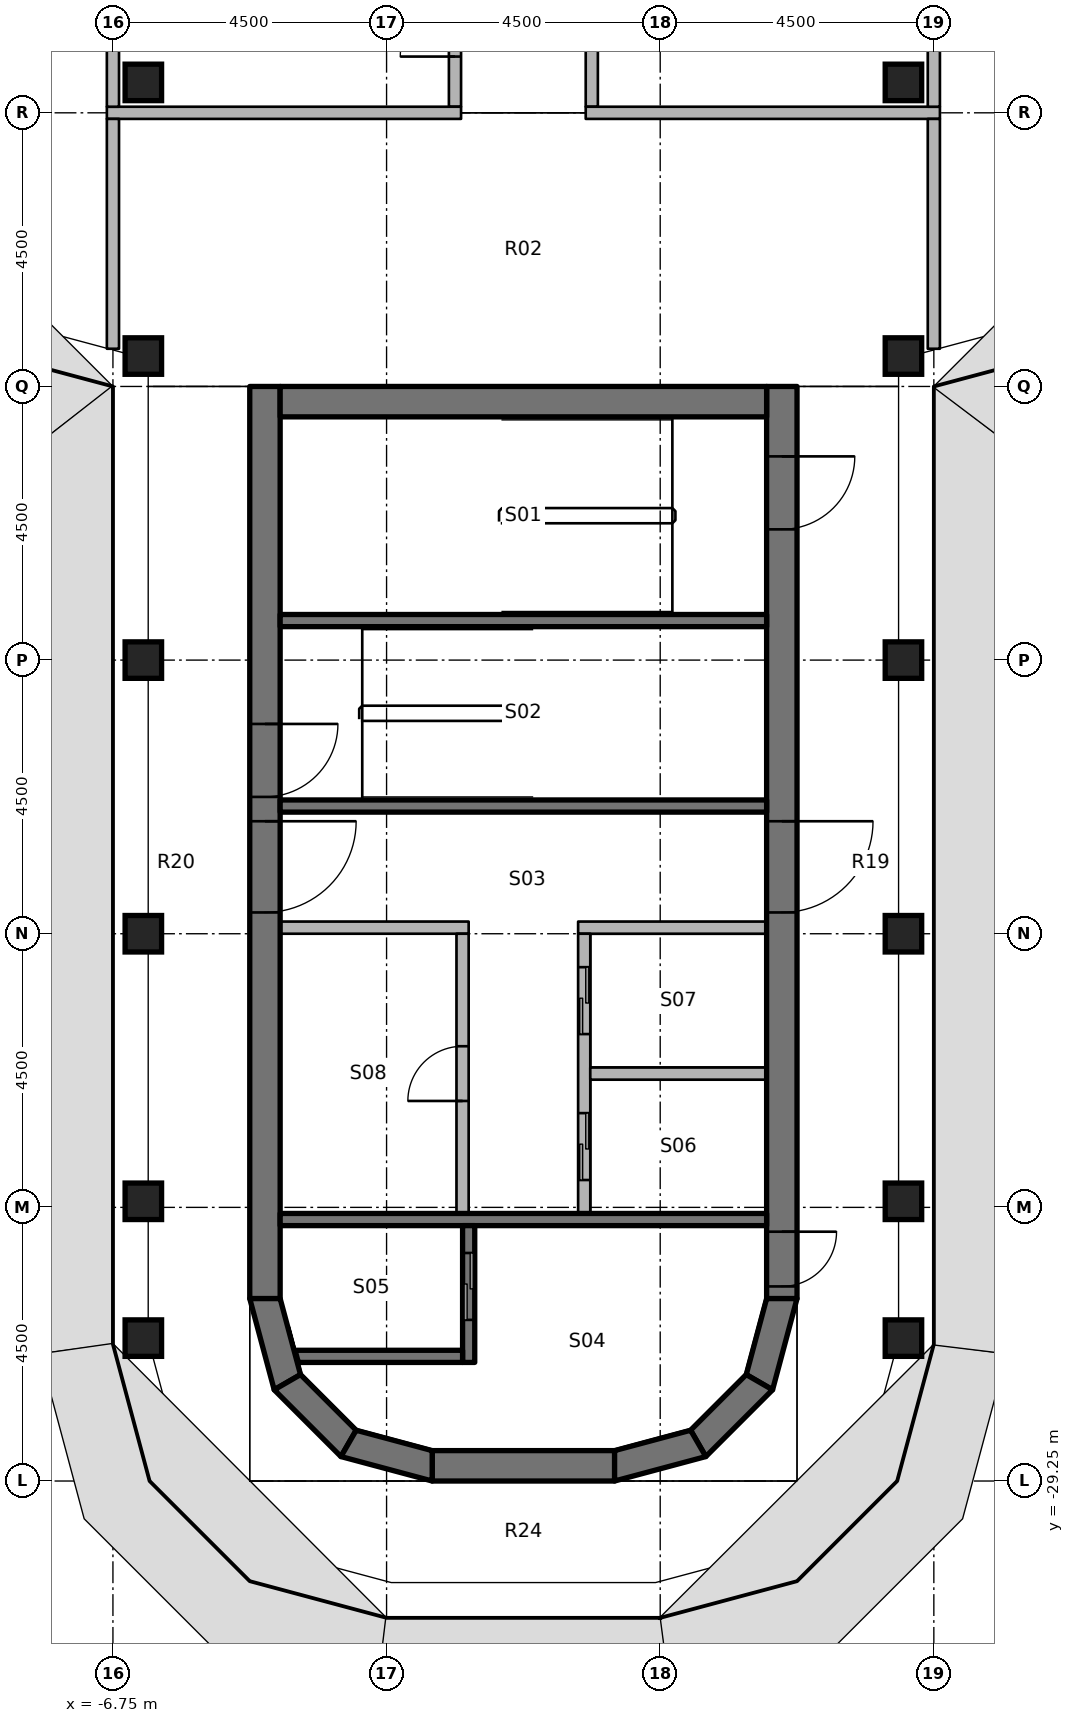
"""IFC4 building model, lengths in metres.
Left out: names, types, materials, properties, quantities, classifications, styles, units other than length and angle.
Written with IfcOpenShell. Run it as: python <this file> out.ifc"""

import sys

from ifc_helpers import new_model, si_unit, direction, frame, frame_2d, origin, origin_2d, place, context, subcontext, project, spatial, polyline, rectangle, outline, extrude, element, fill, save


model = new_model("IFC4")
c1 = context("Model", 3, precision=1e-05, world=origin(), true_north=direction((0.0, 1.0)))
c2 = subcontext(c1, "Body", "Model", "MODEL_VIEW")
j1 = project(units=[si_unit("LENGTHUNIT", "METRE"), si_unit("PLANEANGLEUNIT", "RADIAN")], contexts=[c1])
p1 = place(None, origin())
s1 = spatial("IfcSite", under=j1, at=p1, CompositionType="ELEMENT")
p2 = place(p1, origin())
s2 = spatial("IfcBuilding", under=s1, at=p2, CompositionType="ELEMENT")
p3 = place(p2, frame((0.0, 0.0, 249.8)))
s3 = spatial("IfcBuildingStorey", under=s2, at=p3, CompositionType="ELEMENT", Elevation=249.8)
for number, where, z_axis, x_axis in (
    (1, (-6.25, -26.9, 0.0), (0.0, 0.0, 1.0), (1.0, 0.0, 0.0)),
    (2, (-6.25, -24.65, 0.0), (0.0, 0.0, 1.0), (1.0, 0.0, 0.0)),
    (3, (-6.25, -20.25, 0.0), (0.0, 0.0, 1.0), (1.0, 0.0, 0.0)),
    (4, (-6.25, -15.75, 0.0), (0.0, 0.0, 1.0), (1.0, 0.0, 0.0)),
    (5, (-6.25, -10.75, 0.0), (0.0, 0.0, 1.0), (1.0, 0.0, 0.0)),
    (6, (-6.25, -6.25, 0.0), (0.0, 0.0, 1.0), (1.0, 0.0, 0.0)),
    (7, (6.25, -26.9, 0.0), (0.0, 0.0, 1.0), (1.0, 0.0, 0.0)),
    (8, (6.25, -24.65, 0.0), (0.0, 0.0, 1.0), (1.0, 0.0, 0.0)),
    (9, (6.25, -20.25, 0.0), (0.0, 0.0, 1.0), (1.0, 0.0, 0.0)),
    (10, (6.25, -15.75, 0.0), (0.0, 0.0, 1.0), (1.0, 0.0, 0.0)),
    (11, (6.25, -10.75, 0.0), (0.0, 0.0, 1.0), (1.0, 0.0, 0.0)),
    (12, (6.25, -6.25, 0.0), (0.0, 0.0, 1.0), (1.0, 0.0, 0.0)),
):
    element("IfcColumn", number, at=place(p3, frame(where, z_axis=z_axis, x_axis=x_axis)), inside=s3, PredefinedType="COLUMN", context=c2, shape_type="SweptSolid", body=[
        extrude(rectangle(XDim=0.6, YDim=0.6, at=origin_2d()), origin(), (0.0, 0.0, 1.0), 3.65),
    ])
p4 = place(p3, frame((-4.25, -11.25, 0.0), z_axis=(0.0, 0.0, 1.0), x_axis=(0.0, -1.0, 0.0)))
e13 = element("IfcWall", 13, at=p4, inside=s3, PredefinedType="SHEAR", context=c2, shape_type="SweptSolid", body=[
    extrude(rectangle(XDim=15.0, YDim=0.5, at=frame_2d((7.5, 0.0))), origin(), (0.0, 0.0, 1.0), 3.8),
])
p5 = place(p4, frame((7.15, 0.0, 0.0)))
e14 = element("IfcOpeningElement", 14, at=p5, cuts=e13, PredefinedType="OPENING", context=c2, shape_type="SweptSolid", body=[
    extrude(rectangle(XDim=1.5, YDim=2.3, at=frame_2d((0.75, 1.15))), frame((0.0, 0.26, 0.0), z_axis=(0.0, -1.0, 0.0), x_axis=(1.0, 0.0, 0.0)), (0.0, 0.0, 1.0), 0.52),
])
p6 = place(p4, frame((5.55, 0.0, 0.0)))
e15 = element("IfcOpeningElement", 15, at=p6, cuts=e13, PredefinedType="OPENING", context=c2, shape_type="SweptSolid", body=[
    extrude(rectangle(XDim=1.2, YDim=2.1, at=frame_2d((0.6, 1.05))), frame((0.0, 0.26, 0.0), z_axis=(0.0, -1.0, 0.0), x_axis=(1.0, 0.0, 0.0)), (0.0, 0.0, 1.0), 0.52),
])
p7 = place(p3, frame((4.25, -11.25, 0.0), z_axis=(0.0, 0.0, 1.0), x_axis=(0.0, -1.0, 0.0)))
e16 = element("IfcWall", 16, at=p7, inside=s3, PredefinedType="SHEAR", context=c2, shape_type="SweptSolid", body=[
    extrude(rectangle(XDim=15.0, YDim=0.5, at=frame_2d((7.5, 0.0))), origin(), (0.0, 0.0, 1.0), 3.8),
])
p8 = place(p7, frame((7.15, 0.0, 0.0)))
e17 = element("IfcOpeningElement", 17, at=p8, cuts=e16, PredefinedType="OPENING", context=c2, shape_type="SweptSolid", body=[
    extrude(rectangle(XDim=1.5, YDim=2.3, at=frame_2d((0.75, 1.15))), frame((0.0, 0.26, 0.0), z_axis=(0.0, -1.0, 0.0), x_axis=(1.0, 0.0, 0.0)), (0.0, 0.0, 1.0), 0.52),
])
p9 = place(p7, frame((13.9, 0.0, 0.0)))
e18 = element("IfcOpeningElement", 18, at=p9, cuts=e16, PredefinedType="OPENING", context=c2, shape_type="SweptSolid", body=[
    extrude(rectangle(XDim=0.9, YDim=2.1, at=frame_2d((0.45, 1.05))), frame((0.0, 0.26, 0.0), z_axis=(0.0, -1.0, 0.0), x_axis=(1.0, 0.0, 0.0)), (0.0, 0.0, 1.0), 0.52),
])
p10 = place(p7, frame((1.15, 0.0, 0.0)))
e19 = element("IfcOpeningElement", 19, at=p10, cuts=e16, PredefinedType="OPENING", context=c2, shape_type="SweptSolid", body=[
    extrude(rectangle(XDim=1.2, YDim=2.1, at=frame_2d((0.6, 1.05))), frame((0.0, 0.26, 0.0), z_axis=(0.0, -1.0, 0.0), x_axis=(1.0, 0.0, 0.0)), (0.0, 0.0, 1.0), 0.52),
])
p11 = place(p3, frame((-4.0, -11.5, 0.0), z_axis=(0.0, 0.0, 1.0), x_axis=(1.0, 0.0, 0.0)))
e20 = element("IfcWall", 20, at=p11, inside=s3, PredefinedType="SHEAR", context=c2, shape_type="SweptSolid", body=[
    extrude(rectangle(XDim=8.0, YDim=0.5, at=frame_2d((4.0, 0.0))), origin(), (0.0, 0.0, 1.0), 3.8),
])
p12 = place(p3, frame((-1.5, -29.0, 0.0), z_axis=(0.0, 0.0, 1.0), x_axis=(1.0, 0.0, 0.0)))
e21 = element("IfcWall", 21, at=p12, inside=s3, PredefinedType="SHEAR", context=c2, shape_type="SweptSolid", body=[
    extrude(rectangle(XDim=3.0, YDim=0.5, at=frame_2d((1.5, 0.0))), origin(), (0.0, 0.0, 1.0), 3.8),
])
p13 = place(p3, origin())
e22 = element("IfcWall", 22, at=p13, inside=s3, PredefinedType="SHEAR", context=c2, shape_type="SweptSolid", body=[
    extrude(outline(polyline([(-4.5, -26.25), (-4.098, -27.75), (-3.665, -27.5), (-4.0, -26.25), (-4.5, -26.25)])), origin(), (0.0, 0.0, 1.0), 3.8),
])
p14 = place(p3, origin())
e23 = element("IfcWall", 23, at=p14, inside=s3, PredefinedType="SHEAR", context=c2, shape_type="SweptSolid", body=[
    extrude(outline(polyline([(-4.098, -27.75), (-3.0, -28.848), (-2.75, -28.415), (-3.665, -27.5), (-4.098, -27.75)])), origin(), (0.0, 0.0, 1.0), 3.8),
])
p15 = place(p3, origin())
e24 = element("IfcWall", 24, at=p15, inside=s3, PredefinedType="SHEAR", context=c2, shape_type="SweptSolid", body=[
    extrude(outline(polyline([(-3.0, -28.848), (-1.5, -29.25), (-1.5, -28.75), (-2.75, -28.415), (-3.0, -28.848)])), origin(), (0.0, 0.0, 1.0), 3.8),
])
p16 = place(p3, origin())
e25 = element("IfcWall", 25, at=p16, inside=s3, PredefinedType="SHEAR", context=c2, shape_type="SweptSolid", body=[
    extrude(outline(polyline([(4.5, -26.25), (4.098, -27.75), (3.665, -27.5), (4.0, -26.25), (4.5, -26.25)])), origin(), (0.0, 0.0, 1.0), 3.8),
])
p17 = place(p3, origin())
e26 = element("IfcWall", 26, at=p17, inside=s3, PredefinedType="SHEAR", context=c2, shape_type="SweptSolid", body=[
    extrude(outline(polyline([(4.098, -27.75), (3.0, -28.848), (2.75, -28.415), (3.665, -27.5), (4.098, -27.75)])), origin(), (0.0, 0.0, 1.0), 3.8),
])
p18 = place(p3, origin())
e27 = element("IfcWall", 27, at=p18, inside=s3, PredefinedType="SHEAR", context=c2, shape_type="SweptSolid", body=[
    extrude(outline(polyline([(3.0, -28.848), (1.5, -29.25), (1.5, -28.75), (2.75, -28.415), (3.0, -28.848)])), origin(), (0.0, 0.0, 1.0), 3.8),
])
p19 = place(p3, frame((4.0, -24.95, 0.0), z_axis=(0.0, 0.0, 1.0), x_axis=(-1.0, 0.0, 0.0)))
e28 = element("IfcWall", 28, at=p19, inside=s3, PredefinedType="SHEAR", context=c2, shape_type="SweptSolid", body=[
    extrude(rectangle(XDim=8.0, YDim=0.2, at=frame_2d((4.0, 0.0))), origin(), (0.0, 0.0, 1.0), 3.65),
])
p20 = place(p3, frame((-0.9, -27.3, 0.0), z_axis=(0.0, 0.0, 1.0), x_axis=(0.0, 1.0, 0.0)))
e29 = element("IfcWall", 29, at=p20, inside=s3, PredefinedType="SHEAR", context=c2, shape_type="SweptSolid", body=[
    extrude(rectangle(XDim=2.25, YDim=0.2, at=frame_2d((1.125, 0.0))), origin(), (0.0, 0.0, 1.0), 3.65),
])
p21 = place(p20, frame((0.7, 0.0, 0.0)))
e30 = element("IfcOpeningElement", 30, at=p21, cuts=e29, PredefinedType="OPENING", context=c2, shape_type="SweptSolid", body=[
    extrude(rectangle(XDim=1.1, YDim=2.3, at=frame_2d((0.55, 1.15))), frame((0.0, 0.11, 0.0), z_axis=(0.0, -1.0, 0.0), x_axis=(1.0, 0.0, 0.0)), (0.0, 0.0, 1.0), 0.22),
])
p22 = place(p3, origin())
e31 = element("IfcWall", 31, at=p22, inside=s3, PredefinedType="SHEAR", context=c2, shape_type="SweptSolid", body=[
    extrude(outline(polyline([(-1.0, -27.1), (-3.755, -27.1), (-3.701, -27.3), (-1.0, -27.3), (-1.0, -27.1)])), origin(), (0.0, 0.0, 1.0), 3.65),
])
for number, where, z_axis, x_axis in (
    (32, (4.0, -18.15, 0.0), (0.0, 0.0, 1.0), (-1.0, 0.0, 0.0)),
    (33, (4.0, -15.1, 0.0), (0.0, 0.0, 1.0), (-1.0, 0.0, 0.0)),
):
    element("IfcWall", number, at=place(p3, frame(where, z_axis=z_axis, x_axis=x_axis)), inside=s3, PredefinedType="SHEAR", context=c2, shape_type="SweptSolid", body=[
        extrude(rectangle(XDim=8.0, YDim=0.2, at=frame_2d((4.0, 0.0))), origin(), (0.0, 0.0, 1.0), 3.65),
    ])
p23 = place(p3, frame((4.0, -20.15, 0.0), z_axis=(0.0, 0.0, 1.0), x_axis=(-1.0, 0.0, 0.0)))
e34 = element("IfcWall", 34, at=p23, inside=s3, PredefinedType="PARTITIONING", context=c2, shape_type="SweptSolid", body=[
    extrude(rectangle(XDim=3.1, YDim=0.2, at=frame_2d((1.55, 0.0))), origin(), (0.0, 0.0, 1.0), 3.65),
])
p24 = place(p3, frame((1.0, -24.85, 0.0), z_axis=(0.0, 0.0, 1.0), x_axis=(0.0, 1.0, 0.0)))
e35 = element("IfcWall", 35, at=p24, inside=s3, PredefinedType="PARTITIONING", context=c2, shape_type="SweptSolid", body=[
    extrude(rectangle(XDim=4.6, YDim=0.2, at=frame_2d((2.3, 0.0))), origin(), (0.0, 0.0, 1.0), 3.65),
])
p25 = place(p24, frame((0.55, 0.0, 0.0)))
e36 = element("IfcOpeningElement", 36, at=p25, cuts=e35, PredefinedType="OPENING", context=c2, shape_type="SweptSolid", body=[
    extrude(rectangle(XDim=1.1, YDim=2.3, at=frame_2d((0.55, 1.15))), frame((0.0, 0.11, 0.0), z_axis=(0.0, -1.0, 0.0), x_axis=(1.0, 0.0, 0.0)), (0.0, 0.0, 1.0), 0.22),
])
p26 = place(p24, frame((2.95, 0.0, 0.0)))
e37 = element("IfcOpeningElement", 37, at=p26, cuts=e35, PredefinedType="OPENING", context=c2, shape_type="SweptSolid", body=[
    extrude(rectangle(XDim=1.1, YDim=2.3, at=frame_2d((0.55, 1.15))), frame((0.0, 0.11, 0.0), z_axis=(0.0, -1.0, 0.0), x_axis=(1.0, 0.0, 0.0)), (0.0, 0.0, 1.0), 0.22),
])
p27 = place(p3, frame((-0.9, -20.15, 0.0), z_axis=(0.0, 0.0, 1.0), x_axis=(-1.0, 0.0, 0.0)))
e38 = element("IfcWall", 38, at=p27, inside=s3, PredefinedType="PARTITIONING", context=c2, shape_type="SweptSolid", body=[
    extrude(rectangle(XDim=3.1, YDim=0.2, at=frame_2d((1.55, 0.0))), origin(), (0.0, 0.0, 1.0), 3.65),
])
p28 = place(p3, frame((-1.0, -24.85, 0.0), z_axis=(0.0, 0.0, 1.0), x_axis=(0.0, 1.0, 0.0)))
e39 = element("IfcWall", 39, at=p28, inside=s3, PredefinedType="PARTITIONING", context=c2, shape_type="SweptSolid", body=[
    extrude(rectangle(XDim=4.6, YDim=0.2, at=frame_2d((2.3, 0.0))), origin(), (0.0, 0.0, 1.0), 3.65),
])
p29 = place(p28, frame((1.85, 0.0, 0.0)))
e40 = element("IfcOpeningElement", 40, at=p29, cuts=e39, PredefinedType="OPENING", context=c2, shape_type="SweptSolid", body=[
    extrude(rectangle(XDim=0.9, YDim=2.1, at=frame_2d((0.45, 1.05))), frame((0.0, 0.11, 0.0), z_axis=(0.0, -1.0, 0.0), x_axis=(1.0, 0.0, 0.0)), (0.0, 0.0, 1.0), 0.22),
])
p30 = place(p3, frame((4.0, -22.55, 0.0), z_axis=(0.0, 0.0, 1.0), x_axis=(-1.0, 0.0, 0.0)))
e41 = element("IfcWall", 41, at=p30, inside=s3, PredefinedType="PARTITIONING", context=c2, shape_type="SweptSolid", body=[
    extrude(rectangle(XDim=2.9, YDim=0.2, at=frame_2d((1.45, 0.0))), origin(), (0.0, 0.0, 1.0), 3.65),
])
p31 = place(p3, frame((1.125, -6.65, 0.0), z_axis=(0.0, 0.0, 1.0), x_axis=(0.0, 1.0, 0.0)))
e42 = element("IfcWall", 42, at=p31, inside=s3, PredefinedType="PARTITIONING", context=c2, shape_type="SweptSolid", body=[
    extrude(rectangle(XDim=5.425, YDim=0.2, at=frame_2d((2.712, 0.0))), origin(), (0.0, 0.0, 1.0), 2.75),
])
p32 = place(p3, frame((-1.125, -6.65, 0.0), z_axis=(0.0, 0.0, 1.0), x_axis=(0.0, 1.0, 0.0)))
e43 = element("IfcWall", 43, at=p32, inside=s3, PredefinedType="PARTITIONING", context=c2, shape_type="SweptSolid", body=[
    extrude(rectangle(XDim=2.55, YDim=0.2, at=frame_2d((1.275, 0.0))), origin(), (0.0, 0.0, 1.0), 2.75),
])
p33 = place(p32, frame((0.825, 0.0, 0.0)))
e44 = element("IfcOpeningElement", 44, at=p33, cuts=e43, PredefinedType="OPENING", context=c2, shape_type="SweptSolid", body=[
    extrude(rectangle(XDim=0.9, YDim=2.1, at=frame_2d((0.45, 1.05))), frame((0.0, 0.11, 0.0), z_axis=(0.0, -1.0, 0.0), x_axis=(1.0, 0.0, 0.0)), (0.0, 0.0, 1.0), 0.22),
])
p34 = place(p3, frame((1.025, -6.75, 0.0), z_axis=(0.0, 0.0, 1.0), x_axis=(1.0, 0.0, 0.0)))
e45 = element("IfcWall", 45, at=p34, inside=s3, PredefinedType="PARTITIONING", context=c2, shape_type="SweptSolid", body=[
    extrude(rectangle(XDim=5.825, YDim=0.2, at=frame_2d((2.913, 0.0))), origin(), (0.0, 0.0, 1.0), 2.75),
])
p35 = place(p3, frame((6.75, -10.63, 0.0), z_axis=(0.0, 0.0, 1.0), x_axis=(0.0, 1.0, 0.0)))
e46 = element("IfcWall", 46, at=p35, inside=s3, PredefinedType="PARTITIONING", context=c2, shape_type="SweptSolid", body=[
    extrude(rectangle(XDim=3.78, YDim=0.2, at=frame_2d((1.89, 0.0))), origin(), (0.0, 0.0, 1.0), 2.75),
])
p36 = place(p3, frame((-6.85, -6.75, 0.0), z_axis=(0.0, 0.0, 1.0), x_axis=(1.0, 0.0, 0.0)))
e47 = element("IfcWall", 47, at=p36, inside=s3, PredefinedType="PARTITIONING", context=c2, shape_type="SweptSolid", body=[
    extrude(rectangle(XDim=5.825, YDim=0.2, at=frame_2d((2.913, 0.0))), origin(), (0.0, 0.0, 1.0), 2.75),
])
p37 = place(p3, frame((-6.75, -10.63, 0.0), z_axis=(0.0, 0.0, 1.0), x_axis=(0.0, 1.0, 0.0)))
e48 = element("IfcWall", 48, at=p37, inside=s3, PredefinedType="PARTITIONING", context=c2, shape_type="SweptSolid", body=[
    extrude(rectangle(XDim=3.78, YDim=0.2, at=frame_2d((1.89, 0.0))), origin(), (0.0, 0.0, 1.0), 2.75),
])
p38 = place(p3, frame((6.75, -6.65, 0.0), z_axis=(0.0, 0.0, 1.0), x_axis=(0.0, 1.0, 0.0)))
e49 = element("IfcWall", 49, at=p38, inside=s3, PredefinedType="PARTITIONING", context=c2, shape_type="SweptSolid", body=[
    extrude(rectangle(XDim=5.425, YDim=0.2, at=frame_2d((2.712, 0.0))), origin(), (0.0, 0.0, 1.0), 2.75),
])
p39 = place(p3, frame((-6.75, -6.65, 0.0), z_axis=(0.0, 0.0, 1.0), x_axis=(0.0, 1.0, 0.0)))
e50 = element("IfcWall", 50, at=p39, inside=s3, PredefinedType="PARTITIONING", context=c2, shape_type="SweptSolid", body=[
    extrude(rectangle(XDim=2.55, YDim=0.2, at=frame_2d((1.275, 0.0))), origin(), (0.0, 0.0, 1.0), 2.75),
])
p40 = place(p8, origin())
e51 = element("IfcDoor", 51, at=p40, inside=s3, OperationType="DOUBLE_DOOR_SINGLE_SWING", PredefinedType="DOOR", context=c2, shape_type="SweptSolid", body=[
    extrude(rectangle(XDim=1.5, YDim=2.3, at=frame_2d((0.75, 1.15))), frame((0.0, 0.025, 0.0), z_axis=(0.0, -1.0, 0.0), x_axis=(1.0, 0.0, 0.0)), (0.0, 0.0, 1.0), 0.05),
])
fill(e17, e51)
p41 = place(p5, origin())
e52 = element("IfcDoor", 52, at=p41, inside=s3, OperationType="DOUBLE_DOOR_SINGLE_SWING", PredefinedType="DOOR", context=c2, shape_type="SweptSolid", body=[
    extrude(rectangle(XDim=1.5, YDim=2.3, at=frame_2d((0.75, 1.15))), frame((0.0, 0.025, 0.0), z_axis=(0.0, -1.0, 0.0), x_axis=(1.0, 0.0, 0.0)), (0.0, 0.0, 1.0), 0.05),
])
fill(e14, e52)
p42 = place(p9, origin())
e53 = element("IfcDoor", 53, at=p42, inside=s3, OperationType="SINGLE_SWING_LEFT", PredefinedType="DOOR", context=c2, shape_type="SweptSolid", body=[
    extrude(rectangle(XDim=0.9, YDim=2.1, at=frame_2d((0.45, 1.05))), frame((0.0, 0.025, 0.0), z_axis=(0.0, -1.0, 0.0), x_axis=(1.0, 0.0, 0.0)), (0.0, 0.0, 1.0), 0.05),
])
fill(e18, e53)
p43 = place(p6, origin())
e54 = element("IfcDoor", 54, at=p43, inside=s3, OperationType="SINGLE_SWING_LEFT", PredefinedType="DOOR", context=c2, shape_type="SweptSolid", body=[
    extrude(rectangle(XDim=1.2, YDim=2.1, at=frame_2d((0.6, 1.05))), frame((0.0, 0.025, 0.0), z_axis=(0.0, -1.0, 0.0), x_axis=(1.0, 0.0, 0.0)), (0.0, 0.0, 1.0), 0.05),
])
fill(e15, e54)
p44 = place(p10, origin())
e55 = element("IfcDoor", 55, at=p44, inside=s3, OperationType="SINGLE_SWING_RIGHT", PredefinedType="DOOR", context=c2, shape_type="SweptSolid", body=[
    extrude(rectangle(XDim=1.2, YDim=2.1, at=frame_2d((0.6, 1.05))), frame((0.0, 0.025, 0.0), z_axis=(0.0, -1.0, 0.0), x_axis=(1.0, 0.0, 0.0)), (0.0, 0.0, 1.0), 0.05),
])
fill(e19, e55)
p45 = place(p21, origin())
e56 = element("IfcDoor", 56, at=p45, inside=s3, OperationType="DOUBLE_DOOR_SLIDING", PredefinedType="DOOR", context=c2, shape_type="SweptSolid", body=[
    extrude(rectangle(XDim=1.1, YDim=2.3, at=frame_2d((0.55, 1.15))), frame((0.0, 0.025, 0.0), z_axis=(0.0, -1.0, 0.0), x_axis=(1.0, 0.0, 0.0)), (0.0, 0.0, 1.0), 0.05),
])
fill(e30, e56)
p46 = place(p25, origin())
e57 = element("IfcDoor", 57, at=p46, inside=s3, OperationType="DOUBLE_DOOR_SLIDING", PredefinedType="DOOR", context=c2, shape_type="SweptSolid", body=[
    extrude(rectangle(XDim=1.1, YDim=2.3, at=frame_2d((0.55, 1.15))), frame((0.0, 0.025, 0.0), z_axis=(0.0, -1.0, 0.0), x_axis=(1.0, 0.0, 0.0)), (0.0, 0.0, 1.0), 0.05),
])
fill(e36, e57)
p47 = place(p26, origin())
e58 = element("IfcDoor", 58, at=p47, inside=s3, OperationType="DOUBLE_DOOR_SLIDING", PredefinedType="DOOR", context=c2, shape_type="SweptSolid", body=[
    extrude(rectangle(XDim=1.1, YDim=2.3, at=frame_2d((0.55, 1.15))), frame((0.0, 0.025, 0.0), z_axis=(0.0, -1.0, 0.0), x_axis=(1.0, 0.0, 0.0)), (0.0, 0.0, 1.0), 0.05),
])
fill(e37, e58)
p48 = place(p29, origin())
e59 = element("IfcDoor", 59, at=p48, inside=s3, OperationType="SINGLE_SWING_LEFT", PredefinedType="DOOR", context=c2, shape_type="SweptSolid", body=[
    extrude(rectangle(XDim=0.9, YDim=2.1, at=frame_2d((0.45, 1.05))), frame((0.0, 0.025, 0.0), z_axis=(0.0, -1.0, 0.0), x_axis=(1.0, 0.0, 0.0)), (0.0, 0.0, 1.0), 0.05),
])
fill(e40, e59)
p49 = place(p33, origin())
e60 = element("IfcDoor", 60, at=p49, inside=s3, OperationType="SINGLE_SWING_RIGHT", PredefinedType="DOOR", context=c2, shape_type="SweptSolid", body=[
    extrude(rectangle(XDim=0.9, YDim=2.1, at=frame_2d((0.45, 1.05))), frame((0.0, 0.025, 0.0), z_axis=(0.0, -1.0, 0.0), x_axis=(1.0, 0.0, 0.0)), (0.0, 0.0, 1.0), 0.05),
])
fill(e44, e60)
save(model, sys.argv[1])
